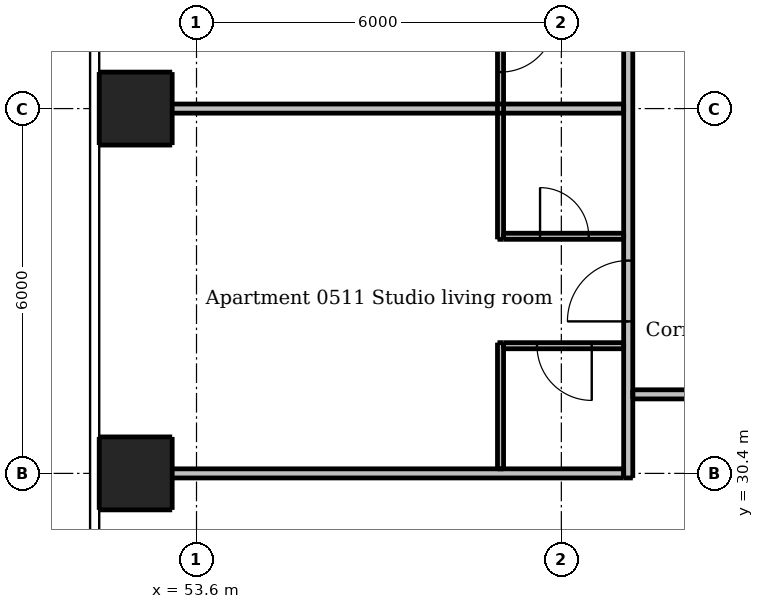
"""IFC4 building model, lengths in metres.
Left out: names, types, materials, properties, quantities, classifications, styles, units other than length and angle.
Written with IfcOpenShell. Run it as: python <this file> out.ifc"""

import sys

from ifc_helpers import new_model, si_unit, direction, frame, frame_2d, origin, origin_2d, place, context, subcontext, project, spatial, rectangle, extrude, element, fill, save


model = new_model("IFC4")
c1 = context("Model", 3, precision=1e-05, world=origin(), true_north=direction((0.0, 1.0)))
c2 = subcontext(c1, "Body", "Model", "MODEL_VIEW")
j1 = project(units=[si_unit("LENGTHUNIT", "METRE"), si_unit("PLANEANGLEUNIT", "RADIAN")], contexts=[c1])
p1 = place(None, origin())
s1 = spatial("IfcSite", under=j1, at=p1, CompositionType="ELEMENT")
p2 = place(p1, origin())
s2 = spatial("IfcBuilding", under=s1, at=p2, CompositionType="ELEMENT")
p3 = place(p2, frame((0.0, 0.0, 23.5)))
s3 = spatial("IfcBuildingStorey", under=s2, at=p3, CompositionType="ELEMENT", Elevation=23.5)
for number, where, z_axis, x_axis in (
    (1, (52.6, 30.4, 0.0), (0.0, 0.0, 1.0), (1.0, 0.0, 0.0)),
    (2, (52.6, 36.4, 0.0), (0.0, 0.0, 1.0), (1.0, 0.0, 0.0)),
):
    element("IfcColumn", number, at=place(p3, frame(where, z_axis=z_axis, x_axis=x_axis)), inside=s3, PredefinedType="COLUMN", context=c2, shape_type="SweptSolid", body=[
        extrude(rectangle(XDim=1.2, YDim=1.2, at=origin_2d()), origin(), (0.0, 0.0, 1.0), 3.05),
    ])
p4 = place(p3, frame((58.6, 30.475, 0.0), z_axis=(0.0, 0.0, 1.0), x_axis=(0.0, 1.0, 0.0)))
e3 = element("IfcWall", 3, at=p4, inside=s3, PredefinedType="PARTITIONING", context=c2, shape_type="SweptSolid", body=[
    extrude(rectangle(XDim=2.075, YDim=0.1, at=frame_2d((1.038, 0.0))), origin(), (0.0, 0.0, 1.0), 3.05),
])
p5 = place(p3, frame((58.6, 38.55, 0.0), z_axis=(0.0, 0.0, 1.0), x_axis=(0.0, -1.0, 0.0)))
e4 = element("IfcWall", 4, at=p5, inside=s3, PredefinedType="PARTITIONING", context=c2, shape_type="SweptSolid", body=[
    extrude(rectangle(XDim=4.3, YDim=0.1, at=frame_2d((2.15, 0.0))), origin(), (0.0, 0.0, 1.0), 3.05),
])
p6 = place(p5, frame((0.65, 0.0, 0.0)))
e5 = element("IfcOpeningElement", 5, at=p6, cuts=e4, PredefinedType="OPENING", context=c2, shape_type="SweptSolid", body=[
    extrude(rectangle(XDim=0.9, YDim=2.1, at=frame_2d((0.45, 1.05))), frame((0.0, 0.06, 0.0), z_axis=(0.0, -1.0, 0.0), x_axis=(1.0, 0.0, 0.0)), (0.0, 0.0, 1.0), 0.12),
])
p7 = place(p3, frame((58.65, 34.3, 0.0), z_axis=(0.0, 0.0, 1.0), x_axis=(1.0, 0.0, 0.0)))
e6 = element("IfcWall", 6, at=p7, inside=s3, PredefinedType="PARTITIONING", context=c2, shape_type="SweptSolid", body=[
    extrude(rectangle(XDim=1.975, YDim=0.1, at=frame_2d((0.988, 0.0))), origin(), (0.0, 0.0, 1.0), 3.05),
])
p8 = place(p7, frame((0.6, 0.0, 0.0)))
e7 = element("IfcOpeningElement", 7, at=p8, cuts=e6, PredefinedType="OPENING", context=c2, shape_type="SweptSolid", body=[
    extrude(rectangle(XDim=0.8, YDim=2.1, at=frame_2d((0.4, 1.05))), frame((0.0, 0.06, 0.0), z_axis=(0.0, -1.0, 0.0), x_axis=(1.0, 0.0, 0.0)), (0.0, 0.0, 1.0), 0.12),
])
p9 = place(p3, frame((60.625, 32.5, 0.0), z_axis=(0.0, 0.0, 1.0), x_axis=(-1.0, 0.0, 0.0)))
e8 = element("IfcWall", 8, at=p9, inside=s3, PredefinedType="PARTITIONING", context=c2, shape_type="SweptSolid", body=[
    extrude(rectangle(XDim=1.975, YDim=0.1, at=frame_2d((0.988, 0.0))), origin(), (0.0, 0.0, 1.0), 3.05),
])
p10 = place(p9, frame((0.525, 0.0, 0.0)))
e9 = element("IfcOpeningElement", 9, at=p10, cuts=e8, PredefinedType="OPENING", context=c2, shape_type="SweptSolid", body=[
    extrude(rectangle(XDim=0.9, YDim=2.1, at=frame_2d((0.45, 1.05))), frame((0.0, 0.06, 0.0), z_axis=(0.0, -1.0, 0.0), x_axis=(1.0, 0.0, 0.0)), (0.0, 0.0, 1.0), 0.12),
])
p11 = place(p3, frame((60.7, 30.325, 0.0), z_axis=(0.0, 0.0, 1.0), x_axis=(0.0, 1.0, 0.0)))
e10 = element("IfcWall", 10, at=p11, inside=s3, PredefinedType="PARTITIONING", context=c2, shape_type="SweptSolid", body=[
    extrude(rectangle(XDim=28.9, YDim=0.15, at=frame_2d((14.45, 0.0))), origin(), (0.0, 0.0, 1.0), 3.05),
])
p12 = place(p11, frame((2.575, 0.0, 0.0)))
e11 = element("IfcOpeningElement", 11, at=p12, cuts=e10, PredefinedType="OPENING", context=c2, shape_type="SweptSolid", body=[
    extrude(rectangle(XDim=1.0, YDim=2.1, at=frame_2d((0.5, 1.05))), frame((0.0, 0.085, 0.0), z_axis=(0.0, -1.0, 0.0), x_axis=(1.0, 0.0, 0.0)), (0.0, 0.0, 1.0), 0.17),
])
p13 = place(p11, frame((8.575, 0.0, 0.0)))
e12 = element("IfcOpeningElement", 12, at=p13, cuts=e10, PredefinedType="OPENING", context=c2, shape_type="SweptSolid", body=[
    extrude(rectangle(XDim=1.0, YDim=2.1, at=frame_2d((0.5, 1.05))), frame((0.0, 0.085, 0.0), z_axis=(0.0, -1.0, 0.0), x_axis=(1.0, 0.0, 0.0)), (0.0, 0.0, 1.0), 0.17),
])
p14 = place(p11, frame((14.575, 0.0, 0.0)))
e13 = element("IfcOpeningElement", 13, at=p14, cuts=e10, PredefinedType="OPENING", context=c2, shape_type="SweptSolid", body=[
    extrude(rectangle(XDim=1.0, YDim=2.1, at=frame_2d((0.5, 1.05))), frame((0.0, 0.085, 0.0), z_axis=(0.0, -1.0, 0.0), x_axis=(1.0, 0.0, 0.0)), (0.0, 0.0, 1.0), 0.17),
])
p15 = place(p11, frame((26.025, 0.0, 0.0)))
e14 = element("IfcOpeningElement", 14, at=p15, cuts=e10, PredefinedType="OPENING", context=c2, shape_type="SweptSolid", body=[
    extrude(rectangle(XDim=1.0, YDim=2.1, at=frame_2d((0.5, 1.05))), frame((0.0, 0.085, 0.0), z_axis=(0.0, -1.0, 0.0), x_axis=(1.0, 0.0, 0.0)), (0.0, 0.0, 1.0), 0.17),
])
p16 = place(p3, frame((52.0, 36.4, 0.0), z_axis=(0.0, 0.0, 1.0), x_axis=(1.0, 0.0, 0.0)))
e15 = element("IfcWall", 15, at=p16, inside=s3, PredefinedType="PARTITIONING", context=c2, shape_type="SweptSolid", body=[
    extrude(rectangle(XDim=8.625, YDim=0.15, at=frame_2d((4.312, 0.0))), origin(), (0.0, 0.0, 1.0), 2.516),
])
p17 = place(p3, frame((89.525, 31.7, 0.0), z_axis=(0.0, 0.0, 1.0), x_axis=(-1.0, 0.0, 0.0)))
e16 = element("IfcWall", 16, at=p17, inside=s3, PredefinedType="PARTITIONING", context=c2, shape_type="SweptSolid", body=[
    extrude(rectangle(XDim=28.75, YDim=0.15, at=frame_2d((14.375, 0.0))), origin(), (0.0, 0.0, 1.0), 3.05),
])
p18 = place(p17, frame((24.625, 0.0, 0.0)))
e17 = element("IfcOpeningElement", 17, at=p18, cuts=e16, PredefinedType="OPENING", context=c2, shape_type="SweptSolid", body=[
    extrude(rectangle(XDim=1.0, YDim=2.1, at=frame_2d((0.5, 1.05))), frame((0.0, 0.085, 0.0), z_axis=(0.0, -1.0, 0.0), x_axis=(1.0, 0.0, 0.0)), (0.0, 0.0, 1.0), 0.17),
])
p19 = place(p17, frame((10.225, 0.0, 0.0)))
e18 = element("IfcOpeningElement", 18, at=p19, cuts=e16, PredefinedType="OPENING", context=c2, shape_type="SweptSolid", body=[
    extrude(rectangle(XDim=1.0, YDim=2.1, at=frame_2d((0.5, 1.05))), frame((0.0, 0.085, 0.0), z_axis=(0.0, -1.0, 0.0), x_axis=(1.0, 0.0, 0.0)), (0.0, 0.0, 1.0), 0.17),
])
p20 = place(p17, frame((2.425, 0.0, 0.0)))
e19 = element("IfcOpeningElement", 19, at=p20, cuts=e16, PredefinedType="OPENING", context=c2, shape_type="SweptSolid", body=[
    extrude(rectangle(XDim=1.0, YDim=2.1, at=frame_2d((0.5, 1.05))), frame((0.0, 0.085, 0.0), z_axis=(0.0, -1.0, 0.0), x_axis=(1.0, 0.0, 0.0)), (0.0, 0.0, 1.0), 0.17),
])
p21 = place(p3, frame((52.0, 30.4, 0.0), z_axis=(0.0, 0.0, 1.0), x_axis=(1.0, 0.0, 0.0)))
e20 = element("IfcWall", 20, at=p21, inside=s3, PredefinedType="PARTITIONING", context=c2, shape_type="SweptSolid", body=[
    extrude(rectangle(XDim=8.625, YDim=0.15, at=frame_2d((4.312, 0.0))), origin(), (0.0, 0.0, 1.0), 2.647),
])
p22 = place(p3, frame((51.5, 28.8, 0.0), z_axis=(0.0, 0.0, 1.0), x_axis=(0.0, 1.0, 0.0)))
e21 = element("IfcWall", 21, at=p22, inside=s3, PredefinedType="PARAPET", context=c2, shape_type="SweptSolid", body=[
    extrude(rectangle(XDim=9.575, YDim=0.2, at=frame_2d((4.788, 0.0))), origin(), (0.0, 0.0, 1.0), 1.1),
])
p23 = place(p12, origin())
e22 = element("IfcDoor", 22, at=p23, inside=s3, OperationType="SINGLE_SWING_LEFT", PredefinedType="DOOR", context=c2, shape_type="SweptSolid", body=[
    extrude(rectangle(XDim=1.0, YDim=2.1, at=frame_2d((0.5, 1.05))), frame((0.0, 0.025, 0.0), z_axis=(0.0, -1.0, 0.0), x_axis=(1.0, 0.0, 0.0)), (0.0, 0.0, 1.0), 0.05),
])
fill(e11, e22)
p24 = place(p10, origin())
e23 = element("IfcDoor", 23, at=p24, inside=s3, OperationType="SINGLE_SWING_LEFT", PredefinedType="DOOR", context=c2, shape_type="SweptSolid", body=[
    extrude(rectangle(XDim=0.9, YDim=2.1, at=frame_2d((0.45, 1.05))), frame((0.0, 0.025, 0.0), z_axis=(0.0, -1.0, 0.0), x_axis=(1.0, 0.0, 0.0)), (0.0, 0.0, 1.0), 0.05),
])
fill(e9, e23)
p25 = place(p8, origin())
e24 = element("IfcDoor", 24, at=p25, inside=s3, OperationType="SINGLE_SWING_LEFT", PredefinedType="DOOR", context=c2, shape_type="SweptSolid", body=[
    extrude(rectangle(XDim=0.8, YDim=2.1, at=frame_2d((0.4, 1.05))), frame((0.0, 0.025, 0.0), z_axis=(0.0, -1.0, 0.0), x_axis=(1.0, 0.0, 0.0)), (0.0, 0.0, 1.0), 0.05),
])
fill(e7, e24)
p26 = place(p6, origin())
e25 = element("IfcDoor", 25, at=p26, inside=s3, OperationType="SINGLE_SWING_LEFT", PredefinedType="DOOR", context=c2, shape_type="SweptSolid", body=[
    extrude(rectangle(XDim=0.9, YDim=2.1, at=frame_2d((0.45, 1.05))), frame((0.0, 0.025, 0.0), z_axis=(0.0, -1.0, 0.0), x_axis=(1.0, 0.0, 0.0)), (0.0, 0.0, 1.0), 0.05),
])
fill(e5, e25)
save(model, sys.argv[1])
